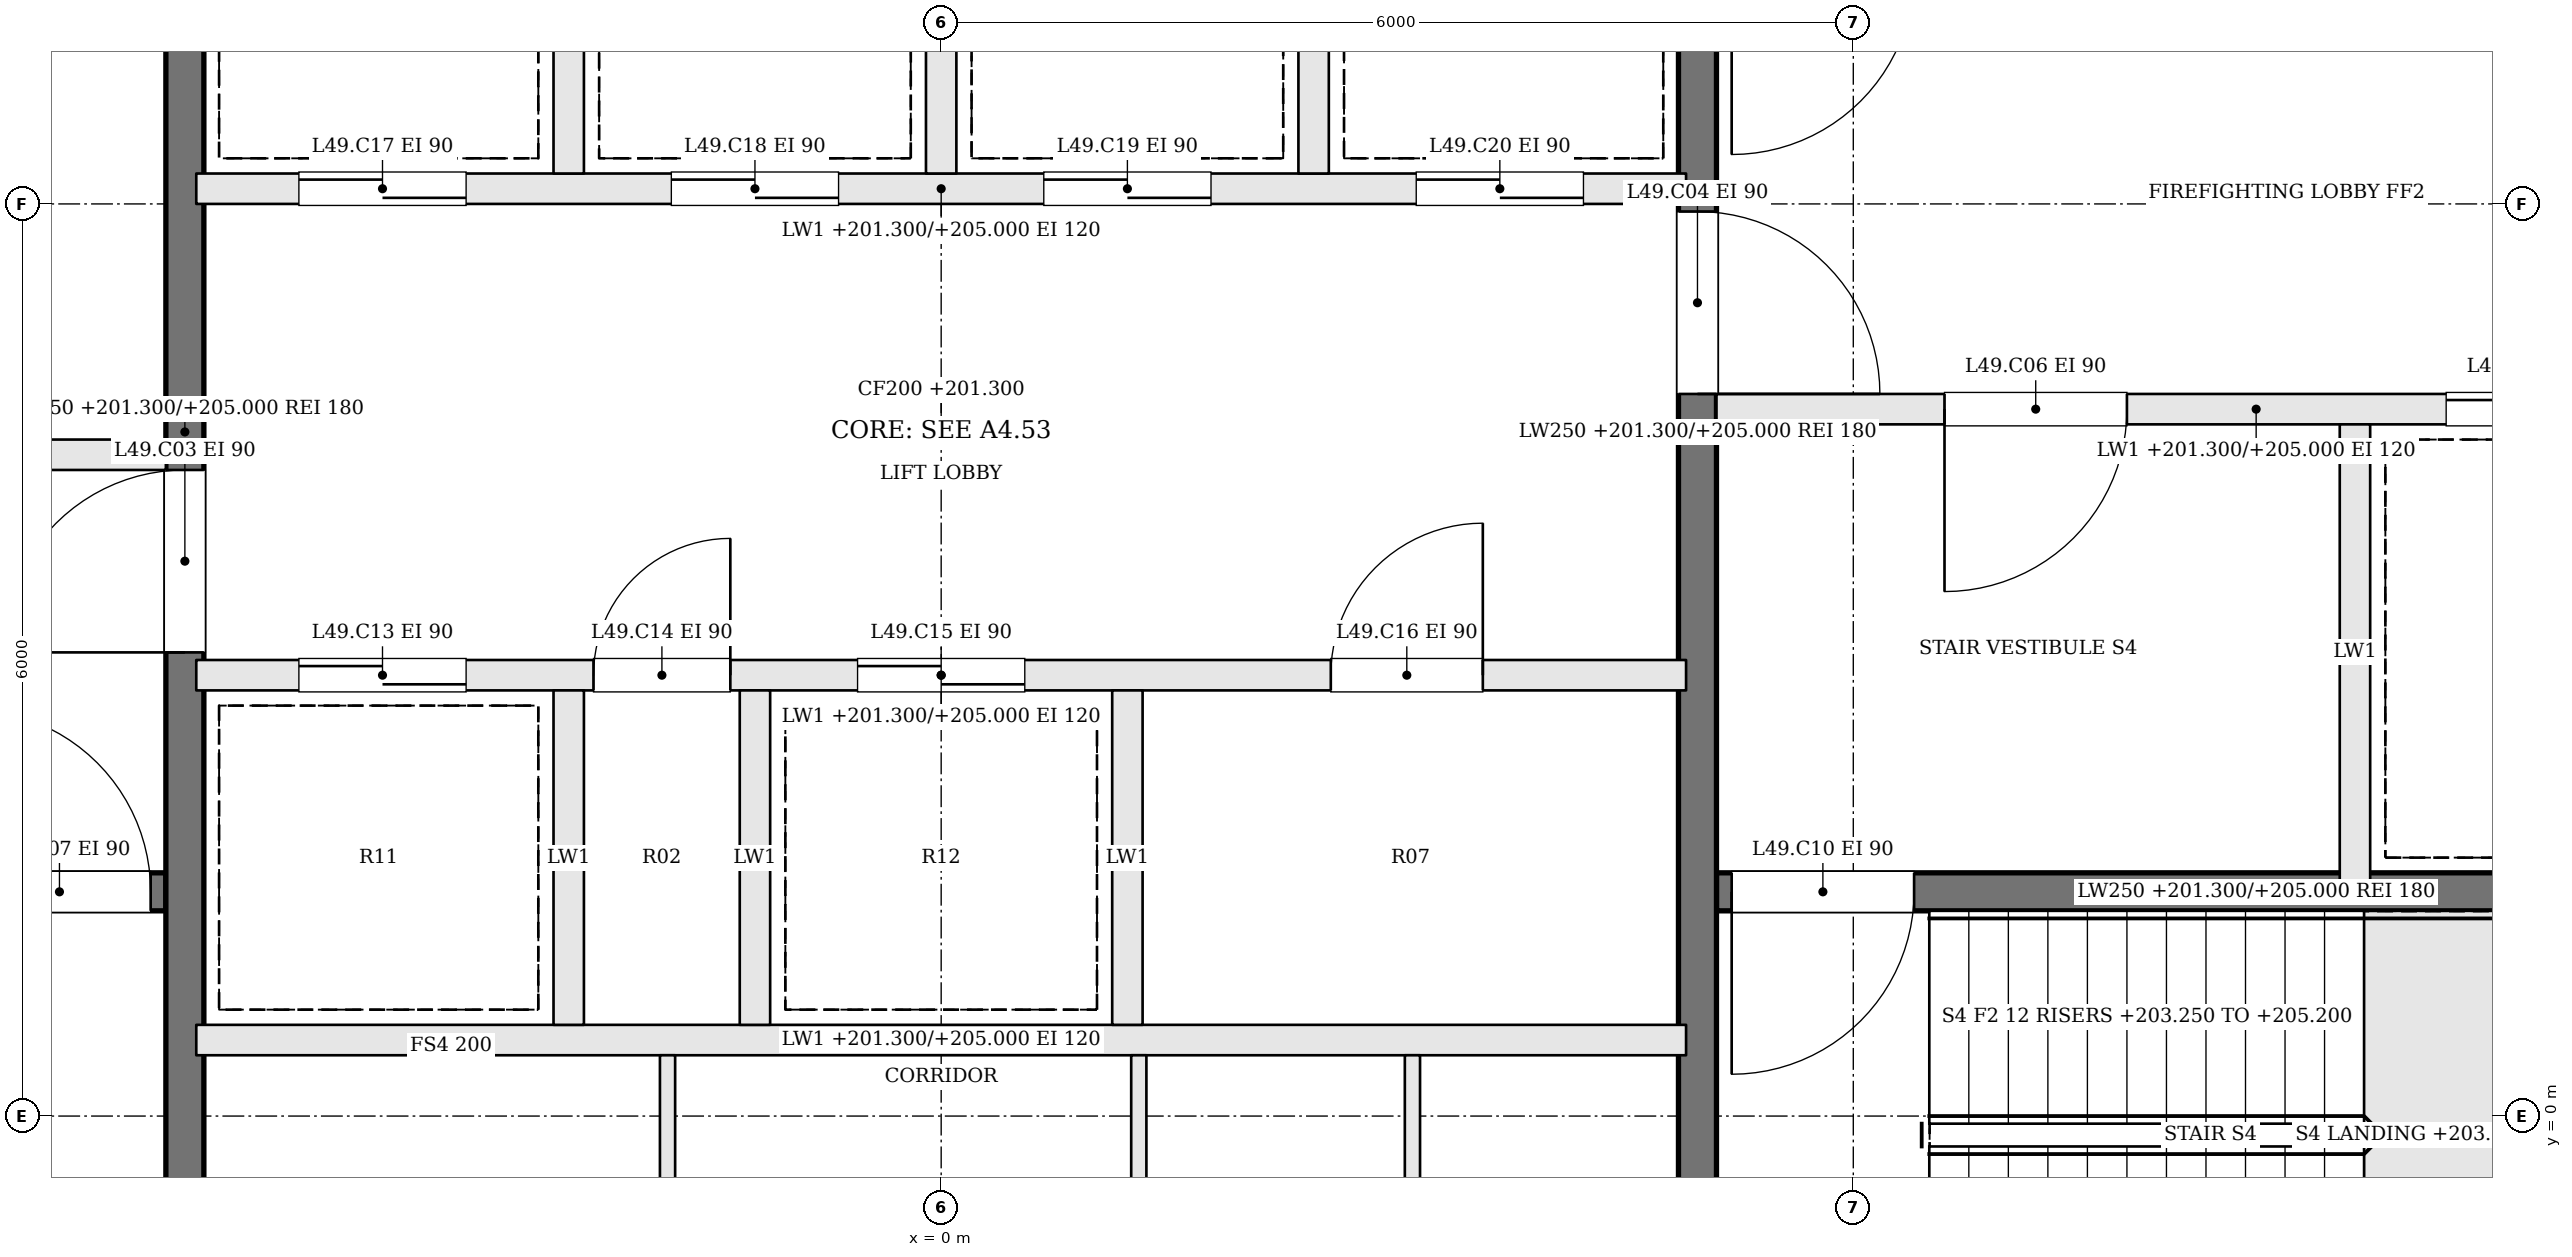
"""IFC4 building model, lengths in metres.
Left out: names, types, materials, properties, quantities, classifications, styles, units other than length and angle.
Written with IfcOpenShell. Run it as: python <this file> out.ifc"""

import sys

from ifc_helpers import new_model, si_unit, direction, frame, frame_2d, origin, place, context, subcontext, project, spatial, rectangle, extrude, element, fill, save


model = new_model("IFC4")
c1 = context("Model", 3, precision=1e-05, world=origin(), true_north=direction((0.0, 1.0)))
c2 = subcontext(c1, "Body", "Model", "MODEL_VIEW")
j1 = project(units=[si_unit("LENGTHUNIT", "METRE"), si_unit("PLANEANGLEUNIT", "RADIAN")], contexts=[c1])
p1 = place(None, origin())
s1 = spatial("IfcSite", under=j1, at=p1, CompositionType="ELEMENT")
p2 = place(p1, origin())
s2 = spatial("IfcBuilding", under=s1, at=p2, CompositionType="ELEMENT")
p3 = place(p2, frame((0.0, 0.0, 201.3)))
s3 = spatial("IfcBuildingStorey", under=s2, at=p3, CompositionType="ELEMENT", Elevation=201.3)
p4 = place(p3, frame((-12.2, 1.475, 0.0), z_axis=(0.0, 0.0, 1.0), x_axis=(1.0, 0.0, 0.0)))
e1 = element("IfcWall", 1, at=p4, inside=s3, PredefinedType="SOLIDWALL", context=c2, shape_type="SweptSolid", body=[
    extrude(rectangle(XDim=7.1, YDim=0.25, at=frame_2d((3.55, 0.0))), origin(), (0.0, 0.0, 1.0), 3.7),
])
p5 = place(p4, frame((5.8, 0.0, 0.0)))
e2 = element("IfcOpeningElement", 2, at=p5, cuts=e1, PredefinedType="OPENING", context=c2, shape_type="SweptSolid", body=[
    extrude(rectangle(XDim=1.2, YDim=2.1, at=frame_2d((0.6, 1.05))), frame((0.0, 0.135, 0.0), z_axis=(0.0, -1.0, 0.0), x_axis=(1.0, 0.0, 0.0)), (0.0, 0.0, 1.0), 0.27),
])
p6 = place(p3, frame((-12.2, 4.35, 0.0), z_axis=(0.0, 0.0, 1.0), x_axis=(1.0, 0.0, 0.0)))
e3 = element("IfcWall", 3, at=p6, inside=s3, PredefinedType="SOLIDWALL", context=c2, shape_type="SweptSolid", body=[
    extrude(rectangle(XDim=7.1, YDim=0.2, at=frame_2d((3.55, 0.0))), origin(), (0.0, 0.0, 1.0), 3.7),
])
p7 = place(p6, frame((4.4, 0.0, 0.0)))
e4 = element("IfcOpeningElement", 4, at=p7, cuts=e3, PredefinedType="OPENING", context=c2, shape_type="SweptSolid", body=[
    extrude(rectangle(XDim=1.2, YDim=2.1, at=frame_2d((0.6, 1.05))), frame((0.0, 0.11, 0.0), z_axis=(0.0, -1.0, 0.0), x_axis=(1.0, 0.0, 0.0)), (0.0, 0.0, 1.0), 0.22),
])
p8 = place(p6, frame((1.1, 0.0, 0.0)))
e5 = element("IfcOpeningElement", 5, at=p8, cuts=e3, PredefinedType="OPENING", context=c2, shape_type="SweptSolid", body=[
    extrude(rectangle(XDim=1.2, YDim=2.1, at=frame_2d((0.6, 1.05))), frame((0.0, 0.11, 0.0), z_axis=(0.0, -1.0, 0.0), x_axis=(1.0, 0.0, 0.0)), (0.0, 0.0, 1.0), 0.22),
])
p9 = place(p3, frame((12.2, 4.65, 0.0), z_axis=(0.0, 0.0, 1.0), x_axis=(-1.0, 0.0, 0.0)))
e6 = element("IfcWall", 6, at=p9, inside=s3, PredefinedType="SOLIDWALL", context=c2, shape_type="SweptSolid", body=[
    extrude(rectangle(XDim=7.1, YDim=0.2, at=frame_2d((3.55, 0.0))), origin(), (0.0, 0.0, 1.0), 3.7),
])
p10 = place(p9, frame((4.4, 0.0, 0.0)))
e7 = element("IfcOpeningElement", 7, at=p10, cuts=e6, PredefinedType="OPENING", context=c2, shape_type="SweptSolid", body=[
    extrude(rectangle(XDim=1.2, YDim=2.1, at=frame_2d((0.6, 1.05))), frame((0.0, 0.11, 0.0), z_axis=(0.0, -1.0, 0.0), x_axis=(1.0, 0.0, 0.0)), (0.0, 0.0, 1.0), 0.22),
])
p11 = place(p9, frame((1.1, 0.0, 0.0)))
e8 = element("IfcOpeningElement", 8, at=p11, cuts=e6, PredefinedType="OPENING", context=c2, shape_type="SweptSolid", body=[
    extrude(rectangle(XDim=1.2, YDim=2.1, at=frame_2d((0.6, 1.05))), frame((0.0, 0.11, 0.0), z_axis=(0.0, -1.0, 0.0), x_axis=(1.0, 0.0, 0.0)), (0.0, 0.0, 1.0), 0.22),
])
p12 = place(p3, frame((12.2, 1.475, 0.0), z_axis=(0.0, 0.0, 1.0), x_axis=(-1.0, 0.0, 0.0)))
e9 = element("IfcWall", 9, at=p12, inside=s3, PredefinedType="SOLIDWALL", context=c2, shape_type="SweptSolid", body=[
    extrude(rectangle(XDim=7.1, YDim=0.25, at=frame_2d((3.55, 0.0))), origin(), (0.0, 0.0, 1.0), 3.7),
])
p13 = place(p12, frame((5.8, 0.0, 0.0)))
e10 = element("IfcOpeningElement", 10, at=p13, cuts=e9, PredefinedType="OPENING", context=c2, shape_type="SweptSolid", body=[
    extrude(rectangle(XDim=1.2, YDim=2.1, at=frame_2d((0.6, 1.05))), frame((0.0, 0.135, 0.0), z_axis=(0.0, -1.0, 0.0), x_axis=(1.0, 0.0, 0.0)), (0.0, 0.0, 1.0), 0.27),
])
p14 = place(p3, frame((9.3, 4.55, 0.0), z_axis=(0.0, 0.0, 1.0), x_axis=(0.0, -1.0, 0.0)))
e11 = element("IfcWall", 11, at=p14, inside=s3, PredefinedType="SOLIDWALL", context=c2, shape_type="SweptSolid", body=[
    extrude(rectangle(XDim=3.0, YDim=0.2, at=frame_2d((1.5, 0.0))), origin(), (0.0, 0.0, 1.0), 3.7),
])
p15 = place(p3, frame((-4.975, -2.2, 0.0), z_axis=(0.0, 0.0, 1.0), x_axis=(0.0, 1.0, 0.0)))
e12 = element("IfcWall", 12, at=p15, inside=s3, PredefinedType="SOLIDWALL", context=c2, shape_type="SweptSolid", body=[
    extrude(rectangle(XDim=13.4, YDim=0.25, at=frame_2d((6.7, 0.0))), origin(), (0.0, 0.0, 1.0), 3.7),
])
p16 = place(p15, frame((5.25, 0.0, 0.0)))
e13 = element("IfcOpeningElement", 13, at=p16, cuts=e12, PredefinedType="OPENING", context=c2, shape_type="SweptSolid", body=[
    extrude(rectangle(XDim=1.2, YDim=2.1, at=frame_2d((0.6, 1.05))), frame((0.0, 0.135, 0.0), z_axis=(0.0, -1.0, 0.0), x_axis=(1.0, 0.0, 0.0)), (0.0, 0.0, 1.0), 0.27),
])
p17 = place(p3, frame((4.975, 11.2, 0.0), z_axis=(0.0, 0.0, 1.0), x_axis=(0.0, -1.0, 0.0)))
e14 = element("IfcWall", 14, at=p17, inside=s3, PredefinedType="SOLIDWALL", context=c2, shape_type="SweptSolid", body=[
    extrude(rectangle(XDim=13.4, YDim=0.25, at=frame_2d((6.7, 0.0))), origin(), (0.0, 0.0, 1.0), 3.7),
])
p18 = place(p17, frame((5.25, 0.0, 0.0)))
e15 = element("IfcOpeningElement", 15, at=p18, cuts=e14, PredefinedType="OPENING", context=c2, shape_type="SweptSolid", body=[
    extrude(rectangle(XDim=1.2, YDim=2.1, at=frame_2d((0.6, 1.05))), frame((0.0, 0.135, 0.0), z_axis=(0.0, -1.0, 0.0), x_axis=(1.0, 0.0, 0.0)), (0.0, 0.0, 1.0), 0.27),
])
p19 = place(p3, frame((-4.9, 0.5, 0.0), z_axis=(0.0, 0.0, 1.0), x_axis=(1.0, 0.0, 0.0)))
e16 = element("IfcWall", 16, at=p19, inside=s3, PredefinedType="SOLIDWALL", context=c2, shape_type="SweptSolid", body=[
    extrude(rectangle(XDim=9.8, YDim=0.2, at=frame_2d((4.9, 0.0))), origin(), (0.0, 0.0, 1.0), 3.7),
])
p20 = place(p3, frame((-4.9, 2.9, 0.0), z_axis=(0.0, 0.0, 1.0), x_axis=(1.0, 0.0, 0.0)))
e17 = element("IfcWall", 17, at=p20, inside=s3, PredefinedType="SOLIDWALL", context=c2, shape_type="SweptSolid", body=[
    extrude(rectangle(XDim=9.8, YDim=0.2, at=frame_2d((4.9, 0.0))), origin(), (0.0, 0.0, 1.0), 3.7),
])
p21 = place(p20, frame((0.675, 0.0, 0.0)))
e18 = element("IfcOpeningElement", 18, at=p21, cuts=e17, PredefinedType="OPENING", context=c2, shape_type="SweptSolid", body=[
    extrude(rectangle(XDim=1.1, YDim=2.1, at=frame_2d((0.55, 1.05))), frame((0.0, 0.11, 0.0), z_axis=(0.0, -1.0, 0.0), x_axis=(1.0, 0.0, 0.0)), (0.0, 0.0, 1.0), 0.22),
])
p22 = place(p20, frame((2.613, 0.0, 0.0)))
e19 = element("IfcOpeningElement", 19, at=p22, cuts=e17, PredefinedType="OPENING", context=c2, shape_type="SweptSolid", body=[
    extrude(rectangle(XDim=0.9, YDim=2.1, at=frame_2d((0.45, 1.05))), frame((0.0, 0.11, 0.0), z_axis=(0.0, -1.0, 0.0), x_axis=(1.0, 0.0, 0.0)), (0.0, 0.0, 1.0), 0.22),
])
p23 = place(p20, frame((4.35, 0.0, 0.0)))
e20 = element("IfcOpeningElement", 20, at=p23, cuts=e17, PredefinedType="OPENING", context=c2, shape_type="SweptSolid", body=[
    extrude(rectangle(XDim=1.1, YDim=2.1, at=frame_2d((0.55, 1.05))), frame((0.0, 0.11, 0.0), z_axis=(0.0, -1.0, 0.0), x_axis=(1.0, 0.0, 0.0)), (0.0, 0.0, 1.0), 0.22),
])
p24 = place(p20, frame((7.463, 0.0, 0.0)))
e21 = element("IfcOpeningElement", 21, at=p24, cuts=e17, PredefinedType="OPENING", context=c2, shape_type="SweptSolid", body=[
    extrude(rectangle(XDim=1.0, YDim=2.1, at=frame_2d((0.5, 1.05))), frame((0.0, 0.11, 0.0), z_axis=(0.0, -1.0, 0.0), x_axis=(1.0, 0.0, 0.0)), (0.0, 0.0, 1.0), 0.22),
])
p25 = place(p3, frame((-4.9, 6.1, 0.0), z_axis=(0.0, 0.0, 1.0), x_axis=(1.0, 0.0, 0.0)))
e22 = element("IfcWall", 22, at=p25, inside=s3, PredefinedType="SOLIDWALL", context=c2, shape_type="SweptSolid", body=[
    extrude(rectangle(XDim=9.8, YDim=0.2, at=frame_2d((4.9, 0.0))), origin(), (0.0, 0.0, 1.0), 3.7),
])
p26 = place(p25, frame((0.675, 0.0, 0.0)))
e23 = element("IfcOpeningElement", 23, at=p26, cuts=e22, PredefinedType="OPENING", context=c2, shape_type="SweptSolid", body=[
    extrude(rectangle(XDim=1.1, YDim=2.1, at=frame_2d((0.55, 1.05))), frame((0.0, 0.11, 0.0), z_axis=(0.0, -1.0, 0.0), x_axis=(1.0, 0.0, 0.0)), (0.0, 0.0, 1.0), 0.22),
])
p27 = place(p25, frame((3.125, 0.0, 0.0)))
e24 = element("IfcOpeningElement", 24, at=p27, cuts=e22, PredefinedType="OPENING", context=c2, shape_type="SweptSolid", body=[
    extrude(rectangle(XDim=1.1, YDim=2.1, at=frame_2d((0.55, 1.05))), frame((0.0, 0.11, 0.0), z_axis=(0.0, -1.0, 0.0), x_axis=(1.0, 0.0, 0.0)), (0.0, 0.0, 1.0), 0.22),
])
p28 = place(p25, frame((5.575, 0.0, 0.0)))
e25 = element("IfcOpeningElement", 25, at=p28, cuts=e22, PredefinedType="OPENING", context=c2, shape_type="SweptSolid", body=[
    extrude(rectangle(XDim=1.1, YDim=2.1, at=frame_2d((0.55, 1.05))), frame((0.0, 0.11, 0.0), z_axis=(0.0, -1.0, 0.0), x_axis=(1.0, 0.0, 0.0)), (0.0, 0.0, 1.0), 0.22),
])
p29 = place(p25, frame((8.025, 0.0, 0.0)))
e26 = element("IfcOpeningElement", 26, at=p29, cuts=e22, PredefinedType="OPENING", context=c2, shape_type="SweptSolid", body=[
    extrude(rectangle(XDim=1.1, YDim=2.1, at=frame_2d((0.55, 1.05))), frame((0.0, 0.11, 0.0), z_axis=(0.0, -1.0, 0.0), x_axis=(1.0, 0.0, 0.0)), (0.0, 0.0, 1.0), 0.22),
])
for number, where, z_axis, x_axis in (
    (27, (-2.45, 0.6, 0.0), (0.0, 0.0, 1.0), (0.0, 1.0, 0.0)),
    (28, (-1.225, 0.6, 0.0), (0.0, 0.0, 1.0), (0.0, 1.0, 0.0)),
    (29, (1.225, 0.6, 0.0), (0.0, 0.0, 1.0), (0.0, 1.0, 0.0)),
    (30, (-2.45, 6.2, 0.0), (0.0, 0.0, 1.0), (0.0, 1.0, 0.0)),
    (31, (0.0, 6.2, 0.0), (0.0, 0.0, 1.0), (0.0, 1.0, 0.0)),
    (32, (2.45, 6.2, 0.0), (0.0, 0.0, 1.0), (0.0, 1.0, 0.0)),
):
    element("IfcWall", number, at=place(p3, frame(where, z_axis=z_axis, x_axis=x_axis)), inside=s3, PredefinedType="SOLIDWALL", context=c2, shape_type="SweptSolid", body=[
        extrude(rectangle(XDim=2.2, YDim=0.2, at=frame_2d((1.1, 0.0))), origin(), (0.0, 0.0, 1.0), 3.7),
    ])
for number, where, z_axis, x_axis in (
    (33, (-1.8, -2.2, 0.0), (0.0, 0.0, 1.0), (0.0, 1.0, 0.0)),
    (34, (1.3, -2.2, 0.0), (0.0, 0.0, 1.0), (0.0, 1.0, 0.0)),
    (35, (3.1, -2.2, 0.0), (0.0, 0.0, 1.0), (0.0, 1.0, 0.0)),
):
    element("IfcWall", number, at=place(p3, frame(where, z_axis=z_axis, x_axis=x_axis)), inside=s3, PredefinedType="PARTITIONING", context=c2, shape_type="SweptSolid", body=[
        extrude(rectangle(XDim=2.6, YDim=0.1, at=frame_2d((1.3, 0.0))), origin(), (0.0, 0.0, 1.0), 3.7),
    ])
p30 = place(p16, origin())
e36 = element("IfcDoor", 36, at=p30, inside=s3, OperationType="SINGLE_SWING_LEFT", PredefinedType="DOOR", context=c2, shape_type="SweptSolid", body=[
    extrude(rectangle(XDim=1.2, YDim=2.1, at=frame_2d((0.6, 1.05))), frame((0.0, 0.025, 0.0), z_axis=(0.0, -1.0, 0.0), x_axis=(1.0, 0.0, 0.0)), (0.0, 0.0, 1.0), 0.05),
])
fill(e13, e36)
p31 = place(p18, origin())
e37 = element("IfcDoor", 37, at=p31, inside=s3, OperationType="SINGLE_SWING_RIGHT", PredefinedType="DOOR", context=c2, shape_type="SweptSolid", body=[
    extrude(rectangle(XDim=1.2, YDim=2.1, at=frame_2d((0.6, 1.05))), frame((0.0, 0.025, 0.0), z_axis=(0.0, -1.0, 0.0), x_axis=(1.0, 0.0, 0.0)), (0.0, 0.0, 1.0), 0.05),
])
fill(e15, e37)
p32 = place(p10, origin())
e38 = element("IfcDoor", 38, at=p32, inside=s3, OperationType="SINGLE_SWING_RIGHT", PredefinedType="DOOR", context=c2, shape_type="SweptSolid", body=[
    extrude(rectangle(XDim=1.2, YDim=2.1, at=frame_2d((0.6, 1.05))), frame((0.0, 0.025, 0.0), z_axis=(0.0, -1.0, 0.0), x_axis=(1.0, 0.0, 0.0)), (0.0, 0.0, 1.0), 0.05),
])
fill(e7, e38)
p33 = place(p5, origin())
e39 = element("IfcDoor", 39, at=p33, inside=s3, OperationType="SINGLE_SWING_LEFT", PredefinedType="DOOR", context=c2, shape_type="SweptSolid", body=[
    extrude(rectangle(XDim=1.2, YDim=2.1, at=frame_2d((0.6, 1.05))), frame((0.0, 0.025, 0.0), z_axis=(0.0, -1.0, 0.0), x_axis=(1.0, 0.0, 0.0)), (0.0, 0.0, 1.0), 0.05),
])
fill(e2, e39)
p34 = place(p13, origin())
e40 = element("IfcDoor", 40, at=p34, inside=s3, OperationType="SINGLE_SWING_RIGHT", PredefinedType="DOOR", context=c2, shape_type="SweptSolid", body=[
    extrude(rectangle(XDim=1.2, YDim=2.1, at=frame_2d((0.6, 1.05))), frame((0.0, 0.025, 0.0), z_axis=(0.0, -1.0, 0.0), x_axis=(1.0, 0.0, 0.0)), (0.0, 0.0, 1.0), 0.05),
])
fill(e10, e40)
p35 = place(p11, origin())
e41 = element("IfcDoor", 41, at=p35, inside=s3, OperationType="SLIDING_TO_RIGHT", PredefinedType="DOOR", context=c2, shape_type="SweptSolid", body=[
    extrude(rectangle(XDim=1.2, YDim=2.1, at=frame_2d((0.6, 1.05))), frame((0.0, 0.025, 0.0), z_axis=(0.0, -1.0, 0.0), x_axis=(1.0, 0.0, 0.0)), (0.0, 0.0, 1.0), 0.05),
])
fill(e8, e41)
p36 = place(p21, origin())
e42 = element("IfcDoor", 42, at=p36, inside=s3, OperationType="SLIDING_TO_RIGHT", PredefinedType="DOOR", context=c2, shape_type="SweptSolid", body=[
    extrude(rectangle(XDim=1.1, YDim=2.1, at=frame_2d((0.55, 1.05))), frame((0.0, 0.025, 0.0), z_axis=(0.0, -1.0, 0.0), x_axis=(1.0, 0.0, 0.0)), (0.0, 0.0, 1.0), 0.05),
])
fill(e18, e42)
p37 = place(p22, origin())
e43 = element("IfcDoor", 43, at=p37, inside=s3, OperationType="SINGLE_SWING_RIGHT", PredefinedType="DOOR", context=c2, shape_type="SweptSolid", body=[
    extrude(rectangle(XDim=0.9, YDim=2.1, at=frame_2d((0.45, 1.05))), frame((0.0, 0.025, 0.0), z_axis=(0.0, -1.0, 0.0), x_axis=(1.0, 0.0, 0.0)), (0.0, 0.0, 1.0), 0.05),
])
fill(e19, e43)
p38 = place(p23, origin())
e44 = element("IfcDoor", 44, at=p38, inside=s3, OperationType="SLIDING_TO_LEFT", PredefinedType="DOOR", context=c2, shape_type="SweptSolid", body=[
    extrude(rectangle(XDim=1.1, YDim=2.1, at=frame_2d((0.55, 1.05))), frame((0.0, 0.025, 0.0), z_axis=(0.0, -1.0, 0.0), x_axis=(1.0, 0.0, 0.0)), (0.0, 0.0, 1.0), 0.05),
])
fill(e20, e44)
p39 = place(p24, origin())
e45 = element("IfcDoor", 45, at=p39, inside=s3, OperationType="SINGLE_SWING_RIGHT", PredefinedType="DOOR", context=c2, shape_type="SweptSolid", body=[
    extrude(rectangle(XDim=1.0, YDim=2.1, at=frame_2d((0.5, 1.05))), frame((0.0, 0.025, 0.0), z_axis=(0.0, -1.0, 0.0), x_axis=(1.0, 0.0, 0.0)), (0.0, 0.0, 1.0), 0.05),
])
fill(e21, e45)
p40 = place(p26, origin())
e46 = element("IfcDoor", 46, at=p40, inside=s3, OperationType="SLIDING_TO_RIGHT", PredefinedType="DOOR", context=c2, shape_type="SweptSolid", body=[
    extrude(rectangle(XDim=1.1, YDim=2.1, at=frame_2d((0.55, 1.05))), frame((0.0, 0.025, 0.0), z_axis=(0.0, -1.0, 0.0), x_axis=(1.0, 0.0, 0.0)), (0.0, 0.0, 1.0), 0.05),
])
fill(e23, e46)
p41 = place(p27, origin())
e47 = element("IfcDoor", 47, at=p41, inside=s3, OperationType="SLIDING_TO_LEFT", PredefinedType="DOOR", context=c2, shape_type="SweptSolid", body=[
    extrude(rectangle(XDim=1.1, YDim=2.1, at=frame_2d((0.55, 1.05))), frame((0.0, 0.025, 0.0), z_axis=(0.0, -1.0, 0.0), x_axis=(1.0, 0.0, 0.0)), (0.0, 0.0, 1.0), 0.05),
])
fill(e24, e47)
p42 = place(p28, origin())
e48 = element("IfcDoor", 48, at=p42, inside=s3, OperationType="SLIDING_TO_RIGHT", PredefinedType="DOOR", context=c2, shape_type="SweptSolid", body=[
    extrude(rectangle(XDim=1.1, YDim=2.1, at=frame_2d((0.55, 1.05))), frame((0.0, 0.025, 0.0), z_axis=(0.0, -1.0, 0.0), x_axis=(1.0, 0.0, 0.0)), (0.0, 0.0, 1.0), 0.05),
])
fill(e25, e48)
p43 = place(p29, origin())
e49 = element("IfcDoor", 49, at=p43, inside=s3, OperationType="SLIDING_TO_LEFT", PredefinedType="DOOR", context=c2, shape_type="SweptSolid", body=[
    extrude(rectangle(XDim=1.1, YDim=2.1, at=frame_2d((0.55, 1.05))), frame((0.0, 0.025, 0.0), z_axis=(0.0, -1.0, 0.0), x_axis=(1.0, 0.0, 0.0)), (0.0, 0.0, 1.0), 0.05),
])
fill(e26, e49)
save(model, sys.argv[1])
